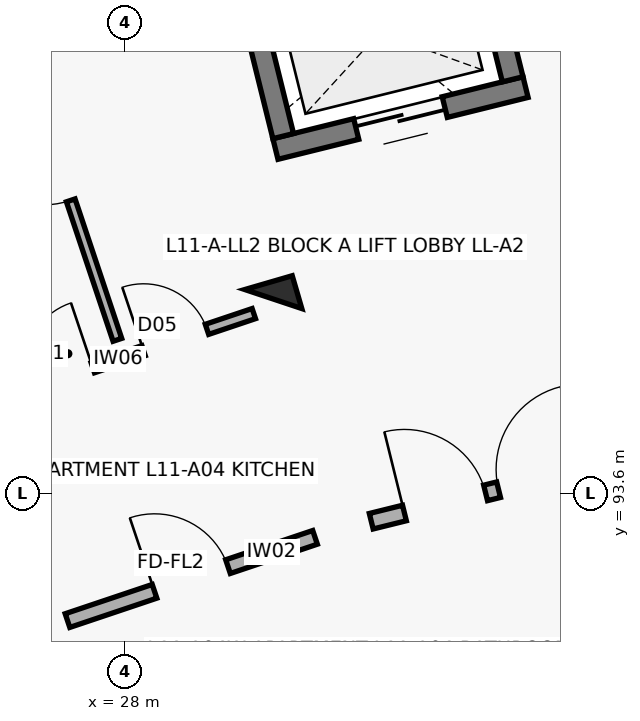
"""IFC4 building model, lengths in metres.
Left out: names, types, materials, properties, quantities, classifications, styles, units other than length and angle.
Written with IfcOpenShell. Run it as: python <this file> out.ifc"""

import sys

from ifc_helpers import new_model, si_unit, direction, frame, frame_2d, origin, origin_2d, place, context, subcontext, project, spatial, rectangle, extrude, element, fill, save


model = new_model("IFC4")
c1 = context("Model", 3, precision=1e-05, world=origin(), true_north=direction((0.0, 1.0)))
c2 = subcontext(c1, "Body", "Model", "MODEL_VIEW")
j1 = project(units=[si_unit("LENGTHUNIT", "METRE"), si_unit("PLANEANGLEUNIT", "RADIAN")], contexts=[c1])
p1 = place(None, origin())
s1 = spatial("IfcSite", under=j1, at=p1, CompositionType="ELEMENT")
p2 = place(p1, origin())
s2 = spatial("IfcBuilding", under=s1, at=p2, CompositionType="ELEMENT")
p3 = place(p2, frame((0.0, 0.0, 36.0)))
s3 = spatial("IfcBuildingStorey", under=s2, at=p3, CompositionType="ELEMENT", Elevation=36.0)
p4 = place(p3, frame((29.954, 96.153, 0.0), z_axis=(0.0, 0.0, 1.0), x_axis=(-0.27966144946, 0.96009867914, 0.0)))
e1 = element("IfcColumn", 1, at=p4, inside=s3, PredefinedType="COLUMN", context=c2, shape_type="SweptSolid", body=[
    extrude(rectangle(XDim=0.45, YDim=0.65, at=origin_2d()), origin(), (0.0, 0.0, 1.0), 3.1),
])
p5 = place(p3, frame((35.098, 94.363, 0.0), z_axis=(0.0, 0.0, 1.0), x_axis=(-0.160227496777, 0.987080112897, 0.0)))
e2 = element("IfcWall", 2, at=p5, inside=s3, PredefinedType="SHEAR", context=c2, shape_type="SweptSolid", body=[
    extrude(rectangle(XDim=7.69, YDim=0.3, at=frame_2d((3.845, 0.0))), origin(), (0.0, 0.0, 1.0), 3.1),
])
p6 = place(p3, frame((33.273, 98.942, 0.0), z_axis=(0.0, 0.0, 1.0), x_axis=(-0.970707542441, -0.240264160972, 0.0)))
e3 = element("IfcWall", 3, at=p6, inside=s3, PredefinedType="SHEAR", context=c2, shape_type="SweptSolid", body=[
    extrude(rectangle(XDim=3.39, YDim=0.28, at=frame_2d((1.695, 0.0))), origin(), (0.0, 0.0, 1.0), 3.1),
])
p7 = place(p6, frame((1.095, 0.0, 0.0)))
e4 = element("IfcOpeningElement", 4, at=p7, cuts=e3, PredefinedType="OPENING", context=c2, shape_type="SweptSolid", body=[
    extrude(rectangle(XDim=1.2, YDim=2.15, at=frame_2d((0.6, 1.075))), frame((0.0, 0.15, 0.0), z_axis=(0.0, -1.0, 0.0), x_axis=(1.0, 0.0, 0.0)), (0.0, 0.0, 1.0), 0.3),
])
p8 = place(p3, frame((33.104, 99.044, 0.0), z_axis=(0.0, 0.0, 1.0), x_axis=(-0.240186044774, 0.970726873995, 0.0)))
e5 = element("IfcWall", 5, at=p8, inside=s3, PredefinedType="SHEAR", context=c2, shape_type="SweptSolid", body=[
    extrude(rectangle(XDim=2.03, YDim=0.28, at=frame_2d((1.015, 0.0))), origin(), (0.0, 0.0, 1.0), 3.1),
])
p9 = place(p3, frame((30.085, 98.297, 0.0), z_axis=(0.0, 0.0, 1.0), x_axis=(-0.2402993748, 0.970698825832, 0.0)))
e6 = element("IfcWall", 6, at=p9, inside=s3, PredefinedType="SHEAR", context=c2, shape_type="SweptSolid", body=[
    extrude(rectangle(XDim=2.03, YDim=0.28, at=frame_2d((1.015, 0.0))), origin(), (0.0, 0.0, 1.0), 3.1),
])
p10 = place(p3, frame((27.247, 91.923, 0.0), z_axis=(0.0, 0.0, 1.0), x_axis=(0.947863007629, 0.318678080151, 0.0)))
e7 = element("IfcWall", 7, at=p10, inside=s3, PredefinedType="SOLIDWALL", context=c2, shape_type="SweptSolid", body=[
    extrude(rectangle(XDim=3.436, YDim=0.19, at=frame_2d((1.718, 0.0))), origin(), (0.0, 0.0, 1.0), 2.08),
])
p11 = place(p10, frame((1.208, 0.0, 0.0)))
e8 = element("IfcOpeningElement", 8, at=p11, cuts=e7, PredefinedType="OPENING", context=c2, shape_type="SweptSolid", body=[
    extrude(rectangle(XDim=1.02, YDim=2.15, at=frame_2d((0.51, 1.075))), frame((0.0, 0.105, 0.0), z_axis=(0.0, -1.0, 0.0), x_axis=(1.0, 0.0, 0.0)), (0.0, 0.0, 1.0), 0.21),
])
p12 = place(p3, frame((26.11, 94.756, 0.0), z_axis=(0.0, 0.0, 1.0), x_axis=(0.947873924847, 0.318645606584, 0.0)))
e9 = element("IfcWall", 9, at=p12, inside=s3, PredefinedType="PARTITIONING", context=c2, shape_type="SweptSolid", body=[
    extrude(rectangle(XDim=3.785, YDim=0.14, at=frame_2d((1.893, 0.0))), origin(), (0.0, 0.0, 1.0), 2.08),
])
p13 = place(p12, frame((0.65, 0.0, 0.0)))
e10 = element("IfcOpeningElement", 10, at=p13, cuts=e9, PredefinedType="OPENING", context=c2, shape_type="SweptSolid", body=[
    extrude(rectangle(XDim=0.9, YDim=2.1, at=frame_2d((0.45, 1.05))), frame((0.0, 0.08, 0.0), z_axis=(0.0, -1.0, 0.0), x_axis=(1.0, 0.0, 0.0)), (0.0, 0.0, 1.0), 0.16),
])
p14 = place(p12, frame((2.255, 0.0, 0.0)))
e11 = element("IfcOpeningElement", 11, at=p14, cuts=e9, PredefinedType="OPENING", context=c2, shape_type="SweptSolid", body=[
    extrude(rectangle(XDim=0.88, YDim=2.1, at=frame_2d((0.44, 1.05))), frame((0.0, 0.08, 0.0), z_axis=(0.0, -1.0, 0.0), x_axis=(1.0, 0.0, 0.0)), (0.0, 0.0, 1.0), 0.16),
])
p15 = place(p3, frame((27.903, 95.616, 0.0), z_axis=(0.0, 0.0, 1.0), x_axis=(-0.31722829501, 0.948349201953, 0.0)))
e12 = element("IfcWall", 12, at=p15, inside=s3, PredefinedType="PARTITIONING", context=c2, shape_type="SweptSolid", body=[
    extrude(rectangle(XDim=5.05, YDim=0.12, at=frame_2d((2.525, 0.0))), origin(), (0.0, 0.0, 1.0), 2.08),
])
p16 = place(p15, frame((1.935, 0.0, 0.0)))
e13 = element("IfcOpeningElement", 13, at=p16, cuts=e12, PredefinedType="OPENING", context=c2, shape_type="SweptSolid", body=[
    extrude(rectangle(XDim=1.18, YDim=2.1, at=frame_2d((0.59, 1.05))), frame((0.0, 0.07, 0.0), z_axis=(0.0, -1.0, 0.0), x_axis=(1.0, 0.0, 0.0)), (0.0, 0.0, 1.0), 0.14),
])
p17 = place(p3, frame((31.243, 93.23, 0.0), z_axis=(0.0, 0.0, 1.0), x_axis=(0.970719238682, 0.240216901263, 0.0)))
e14 = element("IfcWall", 14, at=p17, inside=s3, PredefinedType="SOLIDWALL", context=c2, shape_type="SweptSolid", body=[
    extrude(rectangle(XDim=3.296, YDim=0.21, at=frame_2d((1.648, 0.0))), origin(), (0.0, 0.0, 1.0), 2.08),
])
p18 = place(p17, frame((0.45, 0.0, 0.0)))
e15 = element("IfcOpeningElement", 15, at=p18, cuts=e14, PredefinedType="OPENING", context=c2, shape_type="SweptSolid", body=[
    extrude(rectangle(XDim=1.1, YDim=2.15, at=frame_2d((0.55, 1.075))), frame((0.0, 0.115, 0.0), z_axis=(0.0, -1.0, 0.0), x_axis=(1.0, 0.0, 0.0)), (0.0, 0.0, 1.0), 0.23),
])
p19 = place(p17, frame((1.726, 0.0, 0.0)))
e16 = element("IfcOpeningElement", 16, at=p19, cuts=e14, PredefinedType="OPENING", context=c2, shape_type="SweptSolid", body=[
    extrude(rectangle(XDim=1.12, YDim=2.15, at=frame_2d((0.56, 1.075))), frame((0.0, 0.115, 0.0), z_axis=(0.0, -1.0, 0.0), x_axis=(1.0, 0.0, 0.0)), (0.0, 0.0, 1.0), 0.23),
])
p20 = place(p7, origin())
e17 = element("IfcDoor", 17, at=p20, inside=s3, OperationType="DOUBLE_DOOR_SLIDING", PredefinedType="DOOR", context=c2, shape_type="SweptSolid", body=[
    extrude(rectangle(XDim=1.2, YDim=2.15, at=frame_2d((0.6, 1.075))), frame((0.0, 0.025, 0.0), z_axis=(0.0, -1.0, 0.0), x_axis=(1.0, 0.0, 0.0)), (0.0, 0.0, 1.0), 0.05),
])
fill(e4, e17)
p21 = place(p11, origin())
e18 = element("IfcDoor", 18, at=p21, inside=s3, OperationType="SINGLE_SWING_LEFT", PredefinedType="DOOR", context=c2, shape_type="SweptSolid", body=[
    extrude(rectangle(XDim=1.02, YDim=2.15, at=frame_2d((0.51, 1.075))), frame((0.0, 0.025, 0.0), z_axis=(0.0, -1.0, 0.0), x_axis=(1.0, 0.0, 0.0)), (0.0, 0.0, 1.0), 0.05),
])
fill(e8, e18)
p22 = place(p13, origin())
e19 = element("IfcDoor", 19, at=p22, inside=s3, OperationType="SINGLE_SWING_RIGHT", PredefinedType="DOOR", context=c2, shape_type="SweptSolid", body=[
    extrude(rectangle(XDim=0.9, YDim=2.1, at=frame_2d((0.45, 1.05))), frame((0.0, 0.025, 0.0), z_axis=(0.0, -1.0, 0.0), x_axis=(1.0, 0.0, 0.0)), (0.0, 0.0, 1.0), 0.05),
])
fill(e10, e19)
p23 = place(p14, origin())
e20 = element("IfcDoor", 20, at=p23, inside=s3, OperationType="SINGLE_SWING_LEFT", PredefinedType="DOOR", context=c2, shape_type="SweptSolid", body=[
    extrude(rectangle(XDim=0.88, YDim=2.1, at=frame_2d((0.44, 1.05))), frame((0.0, 0.025, 0.0), z_axis=(0.0, -1.0, 0.0), x_axis=(1.0, 0.0, 0.0)), (0.0, 0.0, 1.0), 0.05),
])
fill(e11, e20)
p24 = place(p16, origin())
e21 = element("IfcDoor", 21, at=p24, inside=s3, OperationType="SINGLE_SWING_RIGHT", PredefinedType="DOOR", context=c2, shape_type="SweptSolid", body=[
    extrude(rectangle(XDim=1.18, YDim=2.1, at=frame_2d((0.59, 1.05))), frame((0.0, 0.025, 0.0), z_axis=(0.0, -1.0, 0.0), x_axis=(1.0, 0.0, 0.0)), (0.0, 0.0, 1.0), 0.05),
])
fill(e13, e21)
p25 = place(p18, origin())
e22 = element("IfcDoor", 22, at=p25, inside=s3, OperationType="SINGLE_SWING_LEFT", PredefinedType="DOOR", context=c2, shape_type="SweptSolid", body=[
    extrude(rectangle(XDim=1.1, YDim=2.15, at=frame_2d((0.55, 1.075))), frame((0.0, 0.025, 0.0), z_axis=(0.0, -1.0, 0.0), x_axis=(1.0, 0.0, 0.0)), (0.0, 0.0, 1.0), 0.05),
])
fill(e15, e22)
p26 = place(p19, origin())
e23 = element("IfcDoor", 23, at=p26, inside=s3, OperationType="SINGLE_SWING_RIGHT", PredefinedType="DOOR", context=c2, shape_type="SweptSolid", body=[
    extrude(rectangle(XDim=1.12, YDim=2.15, at=frame_2d((0.56, 1.075))), frame((0.0, 0.025, 0.0), z_axis=(0.0, -1.0, 0.0), x_axis=(1.0, 0.0, 0.0)), (0.0, 0.0, 1.0), 0.05),
])
fill(e16, e23)
save(model, sys.argv[1])
